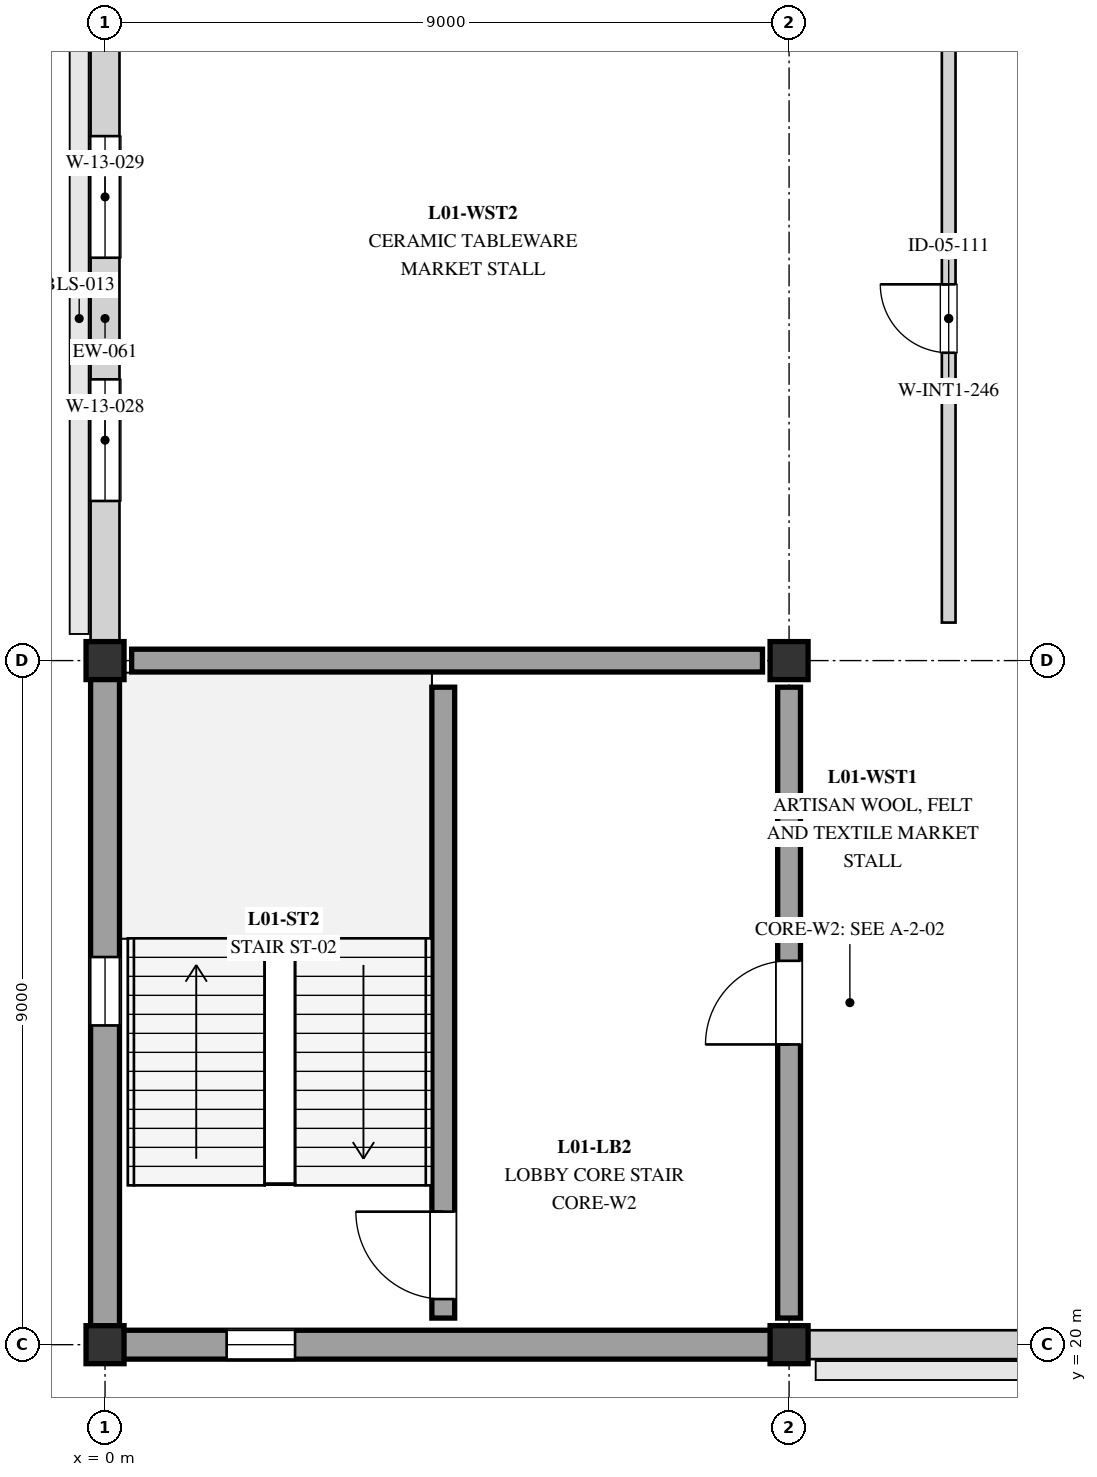
"""IFC4 building model, lengths in metres.
Left out: names, types, materials, properties, quantities, classifications, styles, units other than length and angle.
Written with IfcOpenShell. Run it as: python <this file> out.ifc"""

import sys

from ifc_helpers import new_model, si_unit, direction, frame, frame_2d, origin, origin_2d, place, context, subcontext, project, spatial, rectangle, extrude, element, fill, save


model = new_model("IFC4")
c1 = context("Model", 3, precision=1e-05, world=origin(), true_north=direction((0.0, 1.0)))
c2 = subcontext(c1, "Body", "Model", "MODEL_VIEW")
j1 = project(units=[si_unit("LENGTHUNIT", "METRE"), si_unit("PLANEANGLEUNIT", "RADIAN")], contexts=[c1])
p1 = place(None, origin())
s1 = spatial("IfcSite", under=j1, at=p1, CompositionType="ELEMENT")
p2 = place(p1, origin())
s2 = spatial("IfcBuilding", under=s1, at=p2, CompositionType="ELEMENT")
p3 = place(p2, frame((0.0, 0.0, 4.5)))
s3 = spatial("IfcBuildingStorey", under=s2, at=p3, CompositionType="ELEMENT", Elevation=4.5)
for number, where, z_axis, x_axis in (
    (1, (0.0, 20.0, 0.0), (0.0, 0.0, 1.0), (1.0, 0.0, 0.0)),
    (2, (0.0, 29.0, 0.0), (0.0, 0.0, 1.0), (1.0, 0.0, 0.0)),
    (3, (9.0, 20.0, 0.0), (0.0, 0.0, 1.0), (1.0, 0.0, 0.0)),
    (4, (9.0, 29.0, 0.0), (0.0, 0.0, 1.0), (1.0, 0.0, 0.0)),
):
    element("IfcColumn", number, at=place(p3, frame(where, z_axis=z_axis, x_axis=x_axis)), inside=s3, PredefinedType="COLUMN", context=c2, shape_type="SweptSolid", body=[
        extrude(rectangle(XDim=0.5, YDim=0.5, at=origin_2d()), origin(), (0.0, 0.0, 1.0), 3.9),
    ])
p4 = place(p3, frame((0.0, 20.0, 0.0), z_axis=(0.0, 0.0, 1.0), x_axis=(0.0, 1.0, 0.0)))
e5 = element("IfcWall", 5, at=p4, inside=s3, PredefinedType="STANDARD", context=c2, shape_type="SweptSolid", body=[
    extrude(rectangle(XDim=9.0, YDim=0.38, at=frame_2d((4.5, 0.0))), origin(), (0.0, 0.0, 1.0), 3.48),
])
p5 = place(p4, frame((4.2, 0.0, 0.35)))
e6 = element("IfcOpeningElement", 6, at=p5, cuts=e5, PredefinedType="OPENING", context=c2, shape_type="SweptSolid", body=[
    extrude(rectangle(XDim=0.9, YDim=2.22, at=frame_2d((0.45, 1.11))), frame((0.0, 0.2, 0.0), z_axis=(0.0, -1.0, 0.0), x_axis=(1.0, 0.0, 0.0)), (0.0, 0.0, 1.0), 0.4),
])
p6 = place(p3, frame((0.0, 29.0, 0.0), z_axis=(0.0, 0.0, 1.0), x_axis=(0.0, 1.0, 0.0)))
e7 = element("IfcWall", 7, at=p6, inside=s3, PredefinedType="STANDARD", context=c2, shape_type="SweptSolid", body=[
    extrude(rectangle(XDim=9.0, YDim=0.38, at=frame_2d((4.5, 0.0))), origin(), (0.0, 0.0, 1.0), 2.76),
])
p7 = place(p6, frame((2.1, 0.0, 0.47)))
e8 = element("IfcOpeningElement", 8, at=p7, cuts=e7, PredefinedType="OPENING", context=c2, shape_type="SweptSolid", body=[
    extrude(rectangle(XDim=1.6, YDim=2.1, at=frame_2d((0.8, 1.05))), frame((0.0, 0.2, 0.0), z_axis=(0.0, -1.0, 0.0), x_axis=(1.0, 0.0, 0.0)), (0.0, 0.0, 1.0), 0.4),
])
p8 = place(p6, frame((5.3, 0.0, 0.47)))
e9 = element("IfcOpeningElement", 9, at=p8, cuts=e7, PredefinedType="OPENING", context=c2, shape_type="SweptSolid", body=[
    extrude(rectangle(XDim=1.6, YDim=2.1, at=frame_2d((0.8, 1.05))), frame((0.0, 0.2, 0.0), z_axis=(0.0, -1.0, 0.0), x_axis=(1.0, 0.0, 0.0)), (0.0, 0.0, 1.0), 0.4),
])
p9 = place(p3, frame((9.0, 20.0, 0.0), z_axis=(0.0, 0.0, 1.0), x_axis=(-1.0, 0.0, 0.0)))
e10 = element("IfcWall", 10, at=p9, inside=s3, PredefinedType="STANDARD", context=c2, shape_type="SweptSolid", body=[
    extrude(rectangle(XDim=9.0, YDim=0.38, at=frame_2d((4.5, 0.0))), origin(), (0.0, 0.0, 1.0), 3.48),
])
p10 = place(p9, frame((6.5, 0.0, 0.35)))
e11 = element("IfcOpeningElement", 11, at=p10, cuts=e10, PredefinedType="OPENING", context=c2, shape_type="SweptSolid", body=[
    extrude(rectangle(XDim=0.9, YDim=2.22, at=frame_2d((0.45, 1.11))), frame((0.0, 0.2, 0.0), z_axis=(0.0, -1.0, 0.0), x_axis=(1.0, 0.0, 0.0)), (0.0, 0.0, 1.0), 0.4),
])
p11 = place(p3, frame((9.0, 20.0, 0.0), z_axis=(0.0, 0.0, 1.0), x_axis=(1.0, 0.0, 0.0)))
e12 = element("IfcWall", 12, at=p11, inside=s3, PredefinedType="STANDARD", context=c2, shape_type="SweptSolid", body=[
    extrude(rectangle(XDim=9.0, YDim=0.38, at=frame_2d((4.5, 0.0))), origin(), (0.0, 0.0, 1.0), 2.76),
])
p12 = place(p11, frame((3.2, 0.0, 0.47)))
e13 = element("IfcOpeningElement", 13, at=p12, cuts=e12, PredefinedType="OPENING", context=c2, shape_type="SweptSolid", body=[
    extrude(rectangle(XDim=2.2, YDim=2.1, at=frame_2d((1.1, 1.05))), frame((0.0, 0.2, 0.0), z_axis=(0.0, -1.0, 0.0), x_axis=(1.0, 0.0, 0.0)), (0.0, 0.0, 1.0), 0.4),
])
p13 = place(p3, frame((4.45, 20.35, 0.0), z_axis=(0.0, 0.0, 1.0), x_axis=(0.0, 1.0, 0.0)))
e14 = element("IfcWall", 14, at=p13, inside=s3, PredefinedType="SHEAR", context=c2, shape_type="SweptSolid", body=[
    extrude(rectangle(XDim=8.3, YDim=0.3, at=frame_2d((4.15, 0.0))), origin(), (0.0, 0.0, 1.0), 3.62),
])
p14 = place(p13, frame((0.25, 0.0, 0.0)))
e15 = element("IfcOpeningElement", 15, at=p14, cuts=e14, PredefinedType="OPENING", context=c2, shape_type="SweptSolid", body=[
    extrude(rectangle(XDim=1.15, YDim=2.15, at=frame_2d((0.575, 1.075))), frame((0.0, 0.16, 0.0), z_axis=(0.0, -1.0, 0.0), x_axis=(1.0, 0.0, 0.0)), (0.0, 0.0, 1.0), 0.32),
])
p15 = place(p3, frame((9.0, 20.35, 0.0), z_axis=(0.0, 0.0, 1.0), x_axis=(0.0, 1.0, 0.0)))
e16 = element("IfcWall", 16, at=p15, inside=s3, PredefinedType="SHEAR", context=c2, shape_type="SweptSolid", body=[
    extrude(rectangle(XDim=8.3, YDim=0.3, at=frame_2d((4.15, 0.0))), origin(), (0.0, 0.0, 1.0), 3.62),
])
p16 = place(p15, frame((3.6, 0.0, 0.0)))
e17 = element("IfcOpeningElement", 17, at=p16, cuts=e16, PredefinedType="OPENING", context=c2, shape_type="SweptSolid", body=[
    extrude(rectangle(XDim=1.1, YDim=2.1, at=frame_2d((0.55, 1.05))), frame((0.0, 0.16, 0.0), z_axis=(0.0, -1.0, 0.0), x_axis=(1.0, 0.0, 0.0)), (0.0, 0.0, 1.0), 0.32),
])
p17 = place(p3, frame((0.35, 29.0, 0.0), z_axis=(0.0, 0.0, 1.0), x_axis=(1.0, 0.0, 0.0)))
e18 = element("IfcWall", 18, at=p17, inside=s3, PredefinedType="SHEAR", context=c2, shape_type="SweptSolid", body=[
    extrude(rectangle(XDim=8.3, YDim=0.3, at=frame_2d((4.15, 0.0))), origin(), (0.0, 0.0, 1.0), 3.62),
])
p18 = place(p3, frame((11.1, 29.5, 0.0), z_axis=(0.0, 0.0, 1.0), x_axis=(0.0, 1.0, 0.0)))
e19 = element("IfcWall", 19, at=p18, inside=s3, PredefinedType="STANDARD", context=c2, shape_type="SweptSolid", body=[
    extrude(rectangle(XDim=8.0, YDim=0.18, at=frame_2d((4.0, 0.0))), origin(), (0.0, 0.0, 1.0), 2.65),
])
p19 = place(p18, frame((3.55, 0.0, 0.0)))
e20 = element("IfcOpeningElement", 20, at=p19, cuts=e19, PredefinedType="OPENING", context=c2, shape_type="SweptSolid", body=[
    extrude(rectangle(XDim=0.9, YDim=2.05, at=frame_2d((0.45, 1.025))), frame((0.0, 0.1, 0.0), z_axis=(0.0, -1.0, 0.0), x_axis=(1.0, 0.0, 0.0)), (0.0, 0.0, 1.0), 0.2),
])
p20 = place(p5, origin())
e21 = element("IfcWindow", 21, at=p20, inside=s3, PartitioningType="SINGLE_PANEL", PredefinedType="WINDOW", context=c2, shape_type="SweptSolid", body=[
    extrude(rectangle(XDim=0.9, YDim=2.22, at=frame_2d((0.45, 1.11))), frame((0.0, 0.03, 0.0), z_axis=(0.0, -1.0, 0.0), x_axis=(1.0, 0.0, 0.0)), (0.0, 0.0, 1.0), 0.06),
])
fill(e6, e21)
p21 = place(p7, origin())
e22 = element("IfcWindow", 22, at=p21, inside=s3, PartitioningType="SINGLE_PANEL", PredefinedType="WINDOW", context=c2, shape_type="SweptSolid", body=[
    extrude(rectangle(XDim=1.6, YDim=2.1, at=frame_2d((0.8, 1.05))), frame((0.0, 0.03, 0.0), z_axis=(0.0, -1.0, 0.0), x_axis=(1.0, 0.0, 0.0)), (0.0, 0.0, 1.0), 0.06),
])
fill(e8, e22)
p22 = place(p8, origin())
e23 = element("IfcWindow", 23, at=p22, inside=s3, PartitioningType="SINGLE_PANEL", PredefinedType="WINDOW", context=c2, shape_type="SweptSolid", body=[
    extrude(rectangle(XDim=1.6, YDim=2.1, at=frame_2d((0.8, 1.05))), frame((0.0, 0.03, 0.0), z_axis=(0.0, -1.0, 0.0), x_axis=(1.0, 0.0, 0.0)), (0.0, 0.0, 1.0), 0.06),
])
fill(e9, e23)
p23 = place(p10, origin())
e24 = element("IfcWindow", 24, at=p23, inside=s3, PartitioningType="SINGLE_PANEL", PredefinedType="WINDOW", context=c2, shape_type="SweptSolid", body=[
    extrude(rectangle(XDim=0.9, YDim=2.22, at=frame_2d((0.45, 1.11))), frame((0.0, 0.03, 0.0), z_axis=(0.0, -1.0, 0.0), x_axis=(1.0, 0.0, 0.0)), (0.0, 0.0, 1.0), 0.06),
])
fill(e11, e24)
p24 = place(p14, origin())
e25 = element("IfcDoor", 25, at=p24, inside=s3, OperationType="SINGLE_SWING_RIGHT", PredefinedType="DOOR", context=c2, shape_type="SweptSolid", body=[
    extrude(rectangle(XDim=1.15, YDim=2.15, at=frame_2d((0.575, 1.075))), frame((0.0, 0.025, 0.0), z_axis=(0.0, -1.0, 0.0), x_axis=(1.0, 0.0, 0.0)), (0.0, 0.0, 1.0), 0.05),
])
fill(e15, e25)
p25 = place(p16, origin())
e26 = element("IfcDoor", 26, at=p25, inside=s3, OperationType="SINGLE_SWING_LEFT", PredefinedType="DOOR", context=c2, shape_type="SweptSolid", body=[
    extrude(rectangle(XDim=1.1, YDim=2.1, at=frame_2d((0.55, 1.05))), frame((0.0, 0.025, 0.0), z_axis=(0.0, -1.0, 0.0), x_axis=(1.0, 0.0, 0.0)), (0.0, 0.0, 1.0), 0.05),
])
fill(e17, e26)
p26 = place(p19, origin())
e27 = element("IfcDoor", 27, at=p26, inside=s3, OperationType="SINGLE_SWING_RIGHT", PredefinedType="DOOR", context=c2, shape_type="SweptSolid", body=[
    extrude(rectangle(XDim=0.9, YDim=2.05, at=frame_2d((0.45, 1.025))), frame((0.0, 0.025, 0.0), z_axis=(0.0, -1.0, 0.0), x_axis=(1.0, 0.0, 0.0)), (0.0, 0.0, 1.0), 0.05),
])
fill(e20, e27)
save(model, sys.argv[1])
